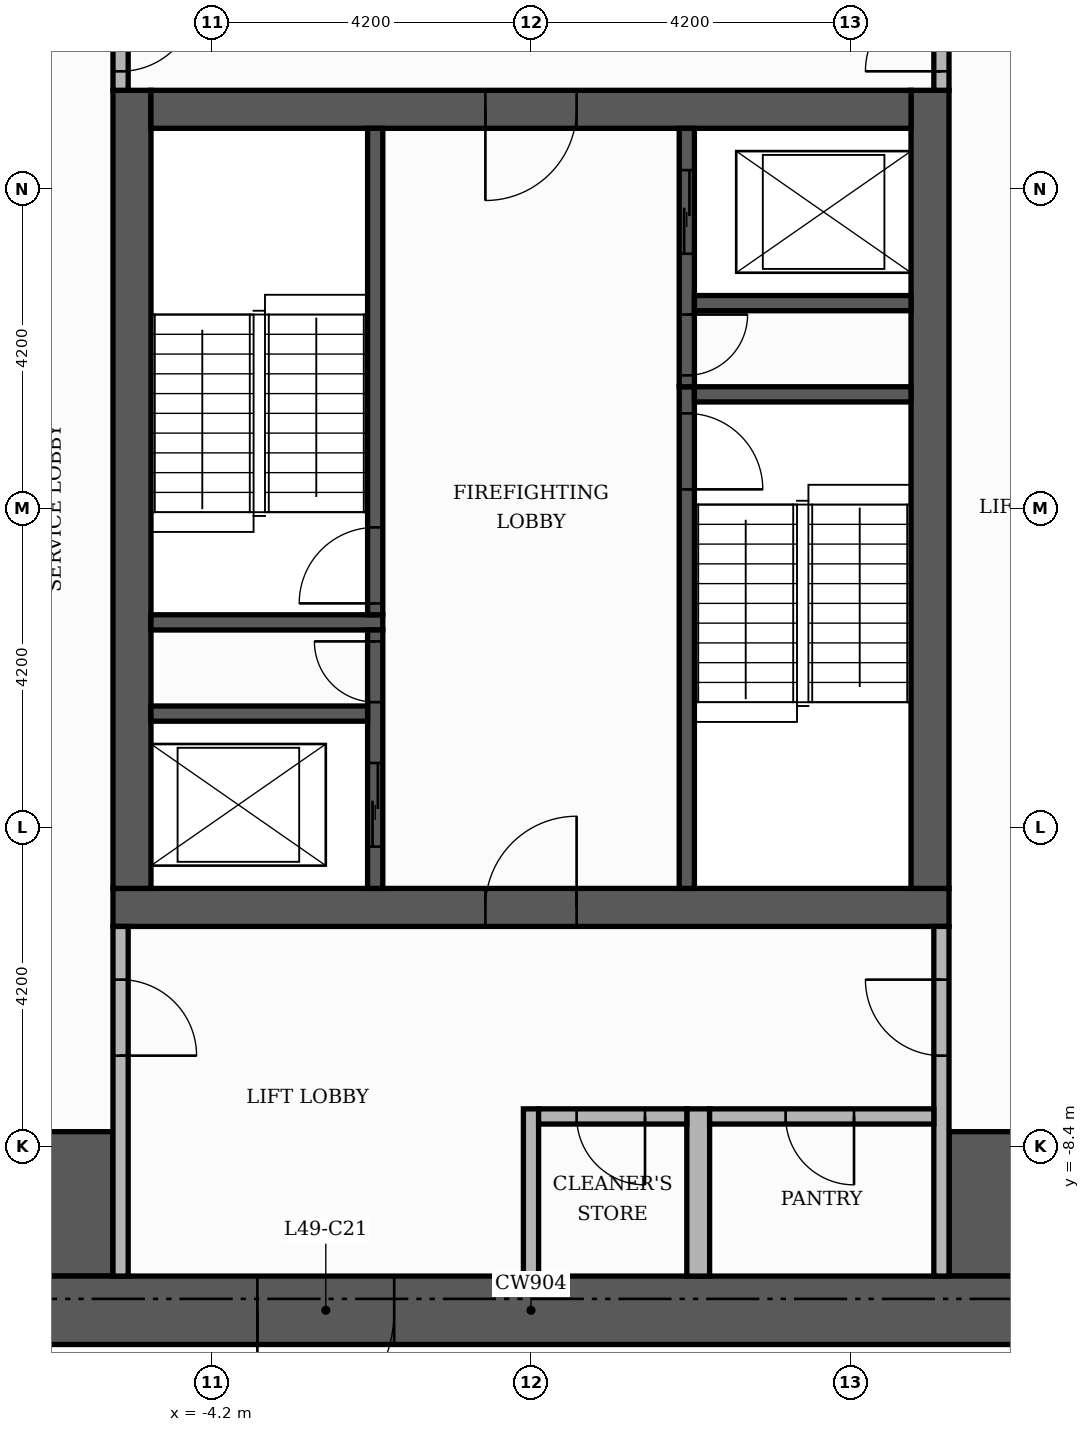
"""IFC4 building model, lengths in metres.
Left out: names, types, materials, properties, quantities, classifications, styles, units other than length and angle.
Written with IfcOpenShell. Run it as: python <this file> out.ifc"""

import sys

from ifc_helpers import new_model, si_unit, direction, frame, frame_2d, origin, place, context, subcontext, project, spatial, rectangle, extrude, element, fill, save


model = new_model("IFC4")
c1 = context("Model", 3, precision=1e-05, world=origin(), true_north=direction((0.0, 1.0)))
c2 = subcontext(c1, "Body", "Model", "MODEL_VIEW")
j1 = project(units=[si_unit("LENGTHUNIT", "METRE"), si_unit("PLANEANGLEUNIT", "RADIAN")], contexts=[c1])
p1 = place(None, origin())
s1 = spatial("IfcSite", under=j1, at=p1, CompositionType="ELEMENT")
p2 = place(p1, origin())
s2 = spatial("IfcBuilding", under=s1, at=p2, CompositionType="ELEMENT")
p3 = place(p2, frame((0.0, 0.0, 207.9)))
s3 = spatial("IfcBuildingStorey", under=s2, at=p3, CompositionType="ELEMENT", Elevation=207.9)
p4 = place(p3, frame((-5.5, -5.25, 0.0), z_axis=(0.0, 0.0, 1.0), x_axis=(1.0, 0.0, 0.0)))
e1 = element("IfcWall", 1, at=p4, inside=s3, PredefinedType="SHEAR", context=c2, shape_type="SweptSolid", body=[
    extrude(rectangle(XDim=11.0, YDim=0.5, at=frame_2d((5.5, 0.0))), origin(), (0.0, 0.0, 1.0), 3.48),
])
p5 = place(p4, frame((4.9, 0.0, 0.0)))
e2 = element("IfcOpeningElement", 2, at=p5, cuts=e1, PredefinedType="OPENING", context=c2, shape_type="SweptSolid", body=[
    extrude(rectangle(XDim=1.2, YDim=2.1, at=frame_2d((0.6, 1.05))), frame((0.0, 0.26, 0.0), z_axis=(0.0, -1.0, 0.0), x_axis=(1.0, 0.0, 0.0)), (0.0, 0.0, 1.0), 0.52),
])
for number, where, z_axis, x_axis in (
    (3, (-5.25, -5.0, 0.0), (0.0, 0.0, 1.0), (0.0, 1.0, 0.0)),
    (4, (5.25, -5.0, 0.0), (0.0, 0.0, 1.0), (0.0, 1.0, 0.0)),
):
    element("IfcWall", number, at=place(p3, frame(where, z_axis=z_axis, x_axis=x_axis)), inside=s3, PredefinedType="SHEAR", context=c2, shape_type="SweptSolid", body=[
        extrude(rectangle(XDim=10.5, YDim=0.5, at=frame_2d((5.25, 0.0))), origin(), (0.0, 0.0, 1.0), 3.48),
    ])
p6 = place(p3, frame((-5.0, 5.25, 0.0), z_axis=(0.0, 0.0, 1.0), x_axis=(1.0, 0.0, 0.0)))
e5 = element("IfcWall", 5, at=p6, inside=s3, PredefinedType="SHEAR", context=c2, shape_type="SweptSolid", body=[
    extrude(rectangle(XDim=10.0, YDim=0.5, at=frame_2d((5.0, 0.0))), origin(), (0.0, 0.0, 1.0), 3.48),
])
p7 = place(p6, frame((4.4, 0.0, 0.0)))
e6 = element("IfcOpeningElement", 6, at=p7, cuts=e5, PredefinedType="OPENING", context=c2, shape_type="SweptSolid", body=[
    extrude(rectangle(XDim=1.2, YDim=2.1, at=frame_2d((0.6, 1.05))), frame((0.0, 0.26, 0.0), z_axis=(0.0, -1.0, 0.0), x_axis=(1.0, 0.0, 0.0)), (0.0, 0.0, 1.0), 0.52),
])
for number, where, z_axis, x_axis in (
    (7, (-10.1, -9.15, 0.0), (0.0, 0.0, 1.0), (1.0, 0.0, 0.0)),
    (8, (5.5, -9.15, 0.0), (0.0, 0.0, 1.0), (1.0, 0.0, 0.0)),
):
    element("IfcWall", number, at=place(p3, frame(where, z_axis=z_axis, x_axis=x_axis)), inside=s3, PredefinedType="SHEAR", context=c2, shape_type="SweptSolid", body=[
        extrude(rectangle(XDim=4.6, YDim=1.9, at=frame_2d((2.3, 0.0))), origin(), (0.0, 0.0, 1.0), 3.48),
    ])
p8 = place(p3, frame((2.05, -5.0, 0.0), z_axis=(0.0, 0.0, 1.0), x_axis=(0.0, 1.0, 0.0)))
e9 = element("IfcWall", 9, at=p8, inside=s3, PredefinedType="SHEAR", context=c2, shape_type="SweptSolid", body=[
    extrude(rectangle(XDim=6.6, YDim=0.2, at=frame_2d((3.3, 0.0))), origin(), (0.0, 0.0, 1.0), 3.48),
])
p9 = place(p8, frame((5.25, 0.0, 0.0)))
e10 = element("IfcOpeningElement", 10, at=p9, cuts=e9, PredefinedType="OPENING", context=c2, shape_type="SweptSolid", body=[
    extrude(rectangle(XDim=1.0, YDim=2.1, at=frame_2d((0.5, 1.05))), frame((0.0, 0.11, 0.0), z_axis=(0.0, -1.0, 0.0), x_axis=(1.0, 0.0, 0.0)), (0.0, 0.0, 1.0), 0.22),
])
p10 = place(p3, frame((-5.0, -1.5, 0.0), z_axis=(0.0, 0.0, 1.0), x_axis=(1.0, 0.0, 0.0)))
e11 = element("IfcWall", 11, at=p10, inside=s3, PredefinedType="SHEAR", context=c2, shape_type="SweptSolid", body=[
    extrude(rectangle(XDim=3.05, YDim=0.2, at=frame_2d((1.525, 0.0))), origin(), (0.0, 0.0, 1.0), 3.48),
])
p11 = place(p3, frame((-2.05, -1.4, 0.0), z_axis=(0.0, 0.0, 1.0), x_axis=(0.0, 1.0, 0.0)))
e12 = element("IfcWall", 12, at=p11, inside=s3, PredefinedType="SHEAR", context=c2, shape_type="SweptSolid", body=[
    extrude(rectangle(XDim=6.4, YDim=0.2, at=frame_2d((3.2, 0.0))), origin(), (0.0, 0.0, 1.0), 3.48),
])
p12 = place(p11, frame((0.15, 0.0, 0.0)))
e13 = element("IfcOpeningElement", 13, at=p12, cuts=e12, PredefinedType="OPENING", context=c2, shape_type="SweptSolid", body=[
    extrude(rectangle(XDim=1.0, YDim=2.1, at=frame_2d((0.5, 1.05))), frame((0.0, 0.11, 0.0), z_axis=(0.0, -1.0, 0.0), x_axis=(1.0, 0.0, 0.0)), (0.0, 0.0, 1.0), 0.22),
])
p13 = place(p3, frame((2.15, 1.5, 0.0), z_axis=(0.0, 0.0, 1.0), x_axis=(1.0, 0.0, 0.0)))
e14 = element("IfcWall", 14, at=p13, inside=s3, PredefinedType="SHEAR", context=c2, shape_type="SweptSolid", body=[
    extrude(rectangle(XDim=2.85, YDim=0.2, at=frame_2d((1.425, 0.0))), origin(), (0.0, 0.0, 1.0), 3.48),
])
p14 = place(p3, frame((-2.05, -5.0, 0.0), z_axis=(0.0, 0.0, 1.0), x_axis=(0.0, 1.0, 0.0)))
e15 = element("IfcWall", 15, at=p14, inside=s3, PredefinedType="SHEAR", context=c2, shape_type="SweptSolid", body=[
    extrude(rectangle(XDim=3.4, YDim=0.2, at=frame_2d((1.7, 0.0))), origin(), (0.0, 0.0, 1.0), 3.48),
])
p15 = place(p14, frame((0.55, 0.0, 0.0)))
e16 = element("IfcOpeningElement", 16, at=p15, cuts=e15, PredefinedType="OPENING", context=c2, shape_type="SweptSolid", body=[
    extrude(rectangle(XDim=1.1, YDim=2.1, at=frame_2d((0.55, 1.05))), frame((0.0, 0.11, 0.0), z_axis=(0.0, -1.0, 0.0), x_axis=(1.0, 0.0, 0.0)), (0.0, 0.0, 1.0), 0.22),
])
p16 = place(p14, frame((2.45, 0.0, 0.0)))
e17 = element("IfcOpeningElement", 17, at=p16, cuts=e15, PredefinedType="OPENING", context=c2, shape_type="SweptSolid", body=[
    extrude(rectangle(XDim=0.8, YDim=2.1, at=frame_2d((0.4, 1.05))), frame((0.0, 0.11, 0.0), z_axis=(0.0, -1.0, 0.0), x_axis=(1.0, 0.0, 0.0)), (0.0, 0.0, 1.0), 0.22),
])
p17 = place(p3, frame((-5.0, -2.7, 0.0), z_axis=(0.0, 0.0, 1.0), x_axis=(1.0, 0.0, 0.0)))
e18 = element("IfcWall", 18, at=p17, inside=s3, PredefinedType="SHEAR", context=c2, shape_type="SweptSolid", body=[
    extrude(rectangle(XDim=2.85, YDim=0.2, at=frame_2d((1.425, 0.0))), origin(), (0.0, 0.0, 1.0), 3.48),
])
p18 = place(p3, frame((2.05, 1.6, 0.0), z_axis=(0.0, 0.0, 1.0), x_axis=(0.0, 1.0, 0.0)))
e19 = element("IfcWall", 19, at=p18, inside=s3, PredefinedType="SHEAR", context=c2, shape_type="SweptSolid", body=[
    extrude(rectangle(XDim=3.4, YDim=0.2, at=frame_2d((1.7, 0.0))), origin(), (0.0, 0.0, 1.0), 3.48),
])
p19 = place(p18, frame((1.75, 0.0, 0.0)))
e20 = element("IfcOpeningElement", 20, at=p19, cuts=e19, PredefinedType="OPENING", context=c2, shape_type="SweptSolid", body=[
    extrude(rectangle(XDim=1.1, YDim=2.1, at=frame_2d((0.55, 1.05))), frame((0.0, 0.11, 0.0), z_axis=(0.0, -1.0, 0.0), x_axis=(1.0, 0.0, 0.0)), (0.0, 0.0, 1.0), 0.22),
])
p20 = place(p18, frame((0.15, 0.0, 0.0)))
e21 = element("IfcOpeningElement", 21, at=p20, cuts=e19, PredefinedType="OPENING", context=c2, shape_type="SweptSolid", body=[
    extrude(rectangle(XDim=0.8, YDim=2.1, at=frame_2d((0.4, 1.05))), frame((0.0, 0.11, 0.0), z_axis=(0.0, -1.0, 0.0), x_axis=(1.0, 0.0, 0.0)), (0.0, 0.0, 1.0), 0.22),
])
p21 = place(p3, frame((2.15, 2.7, 0.0), z_axis=(0.0, 0.0, 1.0), x_axis=(1.0, 0.0, 0.0)))
e22 = element("IfcWall", 22, at=p21, inside=s3, PredefinedType="SHEAR", context=c2, shape_type="SweptSolid", body=[
    extrude(rectangle(XDim=2.85, YDim=0.2, at=frame_2d((1.425, 0.0))), origin(), (0.0, 0.0, 1.0), 3.48),
])
p22 = place(p3, frame((-11.0, -10.55, 0.0), z_axis=(0.0, 0.0, 1.0), x_axis=(1.0, 0.0, 0.0)))
e23 = element("IfcWall", 23, at=p22, inside=s3, PredefinedType="SHEAR", context=c2, shape_type="SweptSolid", body=[
    extrude(rectangle(XDim=22.0, YDim=0.9, at=frame_2d((11.0, 0.0))), origin(), (0.0, 0.0, 1.0), 3.48),
])
p23 = place(p22, frame((7.4, 0.0, 0.0)))
e24 = element("IfcOpeningElement", 24, at=p23, cuts=e23, PredefinedType="OPENING", context=c2, shape_type="SweptSolid", body=[
    extrude(rectangle(XDim=1.8, YDim=2.2, at=frame_2d((0.9, 1.1))), frame((0.0, 0.46, 0.0), z_axis=(0.0, -1.0, 0.0), x_axis=(1.0, 0.0, 0.0)), (0.0, 0.0, 1.0), 0.92),
])
p24 = place(p3, frame((-5.4, -10.1, 0.0), z_axis=(0.0, 0.0, 1.0), x_axis=(0.0, 1.0, 0.0)))
e25 = element("IfcWall", 25, at=p24, inside=s3, PredefinedType="PARTITIONING", context=c2, shape_type="SweptSolid", body=[
    extrude(rectangle(XDim=4.6, YDim=0.2, at=frame_2d((2.3, 0.0))), origin(), (0.0, 0.0, 1.0), 3.48),
])
p25 = place(p24, frame((2.9, 0.0, 0.0)))
e26 = element("IfcOpeningElement", 26, at=p25, cuts=e25, PredefinedType="OPENING", context=c2, shape_type="SweptSolid", body=[
    extrude(rectangle(XDim=1.0, YDim=2.1, at=frame_2d((0.5, 1.05))), frame((0.0, 0.11, 0.0), z_axis=(0.0, -1.0, 0.0), x_axis=(1.0, 0.0, 0.0)), (0.0, 0.0, 1.0), 0.22),
])
p26 = place(p3, frame((0.0, -10.1, 0.0), z_axis=(0.0, 0.0, 1.0), x_axis=(0.0, 1.0, 0.0)))
e27 = element("IfcWall", 27, at=p26, inside=s3, PredefinedType="PARTITIONING", context=c2, shape_type="SweptSolid", body=[
    extrude(rectangle(XDim=2.2, YDim=0.2, at=frame_2d((1.1, 0.0))), origin(), (0.0, 0.0, 1.0), 3.48),
])
p27 = place(p3, frame((2.2, -10.1, 0.0), z_axis=(0.0, 0.0, 1.0), x_axis=(0.0, 1.0, 0.0)))
e28 = element("IfcWall", 28, at=p27, inside=s3, PredefinedType="PARTITIONING", context=c2, shape_type="SweptSolid", body=[
    extrude(rectangle(XDim=2.2, YDim=0.3, at=frame_2d((1.1, 0.0))), origin(), (0.0, 0.0, 1.0), 3.48),
])
p28 = place(p3, frame((5.4, -10.1, 0.0), z_axis=(0.0, 0.0, 1.0), x_axis=(0.0, 1.0, 0.0)))
e29 = element("IfcWall", 29, at=p28, inside=s3, PredefinedType="PARTITIONING", context=c2, shape_type="SweptSolid", body=[
    extrude(rectangle(XDim=4.6, YDim=0.2, at=frame_2d((2.3, 0.0))), origin(), (0.0, 0.0, 1.0), 3.48),
])
p29 = place(p28, frame((2.9, 0.0, 0.0)))
e30 = element("IfcOpeningElement", 30, at=p29, cuts=e29, PredefinedType="OPENING", context=c2, shape_type="SweptSolid", body=[
    extrude(rectangle(XDim=1.0, YDim=2.1, at=frame_2d((0.5, 1.05))), frame((0.0, 0.11, 0.0), z_axis=(0.0, -1.0, 0.0), x_axis=(1.0, 0.0, 0.0)), (0.0, 0.0, 1.0), 0.22),
])
p30 = place(p3, frame((0.1, -8.0, 0.0), z_axis=(0.0, 0.0, 1.0), x_axis=(1.0, 0.0, 0.0)))
e31 = element("IfcWall", 31, at=p30, inside=s3, PredefinedType="PARTITIONING", context=c2, shape_type="SweptSolid", body=[
    extrude(rectangle(XDim=1.95, YDim=0.2, at=frame_2d((0.975, 0.0))), origin(), (0.0, 0.0, 1.0), 3.48),
])
p31 = place(p30, frame((0.5, 0.0, 0.0)))
e32 = element("IfcOpeningElement", 32, at=p31, cuts=e31, PredefinedType="OPENING", context=c2, shape_type="SweptSolid", body=[
    extrude(rectangle(XDim=0.9, YDim=2.1, at=frame_2d((0.45, 1.05))), frame((0.0, 0.11, 0.0), z_axis=(0.0, -1.0, 0.0), x_axis=(1.0, 0.0, 0.0)), (0.0, 0.0, 1.0), 0.22),
])
p32 = place(p3, frame((2.35, -8.0, 0.0), z_axis=(0.0, 0.0, 1.0), x_axis=(1.0, 0.0, 0.0)))
e33 = element("IfcWall", 33, at=p32, inside=s3, PredefinedType="PARTITIONING", context=c2, shape_type="SweptSolid", body=[
    extrude(rectangle(XDim=2.95, YDim=0.2, at=frame_2d((1.475, 0.0))), origin(), (0.0, 0.0, 1.0), 3.48),
])
p33 = place(p32, frame((1.0, 0.0, 0.0)))
e34 = element("IfcOpeningElement", 34, at=p33, cuts=e33, PredefinedType="OPENING", context=c2, shape_type="SweptSolid", body=[
    extrude(rectangle(XDim=0.9, YDim=2.1, at=frame_2d((0.45, 1.05))), frame((0.0, 0.11, 0.0), z_axis=(0.0, -1.0, 0.0), x_axis=(1.0, 0.0, 0.0)), (0.0, 0.0, 1.0), 0.22),
])
p34 = place(p3, frame((-5.4, 5.5, 0.0), z_axis=(0.0, 0.0, 1.0), x_axis=(0.0, 1.0, 0.0)))
e35 = element("IfcWall", 35, at=p34, inside=s3, PredefinedType="PARTITIONING", context=c2, shape_type="SweptSolid", body=[
    extrude(rectangle(XDim=1.55, YDim=0.2, at=frame_2d((0.775, 0.0))), origin(), (0.0, 0.0, 1.0), 3.48),
])
p35 = place(p34, frame((0.25, 0.0, 0.0)))
e36 = element("IfcOpeningElement", 36, at=p35, cuts=e35, PredefinedType="OPENING", context=c2, shape_type="SweptSolid", body=[
    extrude(rectangle(XDim=1.0, YDim=2.1, at=frame_2d((0.5, 1.05))), frame((0.0, 0.11, 0.0), z_axis=(0.0, -1.0, 0.0), x_axis=(1.0, 0.0, 0.0)), (0.0, 0.0, 1.0), 0.22),
])
p36 = place(p3, frame((5.4, 5.5, 0.0), z_axis=(0.0, 0.0, 1.0), x_axis=(0.0, 1.0, 0.0)))
e37 = element("IfcWall", 37, at=p36, inside=s3, PredefinedType="PARTITIONING", context=c2, shape_type="SweptSolid", body=[
    extrude(rectangle(XDim=4.6, YDim=0.2, at=frame_2d((2.3, 0.0))), origin(), (0.0, 0.0, 1.0), 3.48),
])
p37 = place(p36, frame((0.25, 0.0, 0.0)))
e38 = element("IfcOpeningElement", 38, at=p37, cuts=e37, PredefinedType="OPENING", context=c2, shape_type="SweptSolid", body=[
    extrude(rectangle(XDim=1.0, YDim=2.1, at=frame_2d((0.5, 1.05))), frame((0.0, 0.11, 0.0), z_axis=(0.0, -1.0, 0.0), x_axis=(1.0, 0.0, 0.0)), (0.0, 0.0, 1.0), 0.22),
])
p38 = place(p19, origin())
e39 = element("IfcDoor", 39, at=p38, inside=s3, OperationType="SLIDING_TO_LEFT", PredefinedType="DOOR", context=c2, shape_type="SweptSolid", body=[
    extrude(rectangle(XDim=1.1, YDim=2.1, at=frame_2d((0.55, 1.05))), frame((0.0, 0.025, 0.0), z_axis=(0.0, -1.0, 0.0), x_axis=(1.0, 0.0, 0.0)), (0.0, 0.0, 1.0), 0.05),
])
fill(e20, e39)
p39 = place(p15, origin())
e40 = element("IfcDoor", 40, at=p39, inside=s3, OperationType="SLIDING_TO_LEFT", PredefinedType="DOOR", context=c2, shape_type="SweptSolid", body=[
    extrude(rectangle(XDim=1.1, YDim=2.1, at=frame_2d((0.55, 1.05))), frame((0.0, 0.025, 0.0), z_axis=(0.0, -1.0, 0.0), x_axis=(1.0, 0.0, 0.0)), (0.0, 0.0, 1.0), 0.05),
])
fill(e16, e40)
p40 = place(p12, origin())
e41 = element("IfcDoor", 41, at=p40, inside=s3, OperationType="SINGLE_SWING_LEFT", PredefinedType="DOOR", context=c2, shape_type="SweptSolid", body=[
    extrude(rectangle(XDim=1.0, YDim=2.1, at=frame_2d((0.5, 1.05))), frame((0.0, 0.025, 0.0), z_axis=(0.0, -1.0, 0.0), x_axis=(1.0, 0.0, 0.0)), (0.0, 0.0, 1.0), 0.05),
])
fill(e13, e41)
p41 = place(p9, frame((1.0, 0.0, 0.0), z_axis=(0.0, 0.0, 1.0), x_axis=(-1.0, 0.0, 0.0)))
e42 = element("IfcDoor", 42, at=p41, inside=s3, OperationType="SINGLE_SWING_LEFT", PredefinedType="DOOR", context=c2, shape_type="SweptSolid", body=[
    extrude(rectangle(XDim=1.0, YDim=2.1, at=frame_2d((0.5, 1.05))), frame((0.0, 0.025, 0.0), z_axis=(0.0, -1.0, 0.0), x_axis=(1.0, 0.0, 0.0)), (0.0, 0.0, 1.0), 0.05),
])
fill(e10, e42)
p42 = place(p20, frame((0.8, 0.0, 0.0), z_axis=(0.0, 0.0, 1.0), x_axis=(-1.0, 0.0, 0.0)))
e43 = element("IfcDoor", 43, at=p42, inside=s3, OperationType="SINGLE_SWING_RIGHT", PredefinedType="DOOR", context=c2, shape_type="SweptSolid", body=[
    extrude(rectangle(XDim=0.8, YDim=2.1, at=frame_2d((0.4, 1.05))), frame((0.0, 0.025, 0.0), z_axis=(0.0, -1.0, 0.0), x_axis=(1.0, 0.0, 0.0)), (0.0, 0.0, 1.0), 0.05),
])
fill(e21, e43)
p43 = place(p16, origin())
e44 = element("IfcDoor", 44, at=p43, inside=s3, OperationType="SINGLE_SWING_RIGHT", PredefinedType="DOOR", context=c2, shape_type="SweptSolid", body=[
    extrude(rectangle(XDim=0.8, YDim=2.1, at=frame_2d((0.4, 1.05))), frame((0.0, 0.025, 0.0), z_axis=(0.0, -1.0, 0.0), x_axis=(1.0, 0.0, 0.0)), (0.0, 0.0, 1.0), 0.05),
])
fill(e17, e44)
p44 = place(p7, frame((1.2, 0.0, 0.0), z_axis=(0.0, 0.0, 1.0), x_axis=(-1.0, 0.0, 0.0)))
e45 = element("IfcDoor", 45, at=p44, inside=s3, OperationType="SINGLE_SWING_LEFT", PredefinedType="DOOR", context=c2, shape_type="SweptSolid", body=[
    extrude(rectangle(XDim=1.2, YDim=2.1, at=frame_2d((0.6, 1.05))), frame((0.0, 0.025, 0.0), z_axis=(0.0, -1.0, 0.0), x_axis=(1.0, 0.0, 0.0)), (0.0, 0.0, 1.0), 0.05),
])
fill(e6, e45)
p45 = place(p5, origin())
e46 = element("IfcDoor", 46, at=p45, inside=s3, OperationType="SINGLE_SWING_RIGHT", PredefinedType="DOOR", context=c2, shape_type="SweptSolid", body=[
    extrude(rectangle(XDim=1.2, YDim=2.1, at=frame_2d((0.6, 1.05))), frame((0.0, 0.025, 0.0), z_axis=(0.0, -1.0, 0.0), x_axis=(1.0, 0.0, 0.0)), (0.0, 0.0, 1.0), 0.05),
])
fill(e2, e46)
p46 = place(p35, frame((1.0, 0.0, 0.0), z_axis=(0.0, 0.0, 1.0), x_axis=(-1.0, 0.0, 0.0)))
e47 = element("IfcDoor", 47, at=p46, inside=s3, OperationType="SINGLE_SWING_RIGHT", PredefinedType="DOOR", context=c2, shape_type="SweptSolid", body=[
    extrude(rectangle(XDim=1.0, YDim=2.1, at=frame_2d((0.5, 1.05))), frame((0.0, 0.025, 0.0), z_axis=(0.0, -1.0, 0.0), x_axis=(1.0, 0.0, 0.0)), (0.0, 0.0, 1.0), 0.05),
])
fill(e36, e47)
p47 = place(p37, origin())
e48 = element("IfcDoor", 48, at=p47, inside=s3, OperationType="SINGLE_SWING_LEFT", PredefinedType="DOOR", context=c2, shape_type="SweptSolid", body=[
    extrude(rectangle(XDim=1.0, YDim=2.1, at=frame_2d((0.5, 1.05))), frame((0.0, 0.025, 0.0), z_axis=(0.0, -1.0, 0.0), x_axis=(1.0, 0.0, 0.0)), (0.0, 0.0, 1.0), 0.05),
])
fill(e38, e48)
p48 = place(p25, frame((1.0, 0.0, 0.0), z_axis=(0.0, 0.0, 1.0), x_axis=(-1.0, 0.0, 0.0)))
e49 = element("IfcDoor", 49, at=p48, inside=s3, OperationType="SINGLE_SWING_LEFT", PredefinedType="DOOR", context=c2, shape_type="SweptSolid", body=[
    extrude(rectangle(XDim=1.0, YDim=2.1, at=frame_2d((0.5, 1.05))), frame((0.0, 0.025, 0.0), z_axis=(0.0, -1.0, 0.0), x_axis=(1.0, 0.0, 0.0)), (0.0, 0.0, 1.0), 0.05),
])
fill(e26, e49)
p49 = place(p29, origin())
e50 = element("IfcDoor", 50, at=p49, inside=s3, OperationType="SINGLE_SWING_RIGHT", PredefinedType="DOOR", context=c2, shape_type="SweptSolid", body=[
    extrude(rectangle(XDim=1.0, YDim=2.1, at=frame_2d((0.5, 1.05))), frame((0.0, 0.025, 0.0), z_axis=(0.0, -1.0, 0.0), x_axis=(1.0, 0.0, 0.0)), (0.0, 0.0, 1.0), 0.05),
])
fill(e30, e50)
p50 = place(p23, frame((1.8, 0.0, 0.0), z_axis=(0.0, 0.0, 1.0), x_axis=(-1.0, 0.0, 0.0)))
e51 = element("IfcDoor", 51, at=p50, inside=s3, OperationType="DOUBLE_DOOR_SINGLE_SWING", PredefinedType="DOOR", context=c2, shape_type="SweptSolid", body=[
    extrude(rectangle(XDim=1.8, YDim=2.2, at=frame_2d((0.9, 1.1))), frame((0.0, 0.025, 0.0), z_axis=(0.0, -1.0, 0.0), x_axis=(1.0, 0.0, 0.0)), (0.0, 0.0, 1.0), 0.05),
])
fill(e24, e51)
p51 = place(p31, frame((0.9, 0.0, 0.0), z_axis=(0.0, 0.0, 1.0), x_axis=(-1.0, 0.0, 0.0)))
e52 = element("IfcDoor", 52, at=p51, inside=s3, OperationType="SINGLE_SWING_RIGHT", PredefinedType="DOOR", context=c2, shape_type="SweptSolid", body=[
    extrude(rectangle(XDim=0.9, YDim=2.1, at=frame_2d((0.45, 1.05))), frame((0.0, 0.025, 0.0), z_axis=(0.0, -1.0, 0.0), x_axis=(1.0, 0.0, 0.0)), (0.0, 0.0, 1.0), 0.05),
])
fill(e32, e52)
p52 = place(p33, frame((0.9, 0.0, 0.0), z_axis=(0.0, 0.0, 1.0), x_axis=(-1.0, 0.0, 0.0)))
e53 = element("IfcDoor", 53, at=p52, inside=s3, OperationType="SINGLE_SWING_RIGHT", PredefinedType="DOOR", context=c2, shape_type="SweptSolid", body=[
    extrude(rectangle(XDim=0.9, YDim=2.1, at=frame_2d((0.45, 1.05))), frame((0.0, 0.025, 0.0), z_axis=(0.0, -1.0, 0.0), x_axis=(1.0, 0.0, 0.0)), (0.0, 0.0, 1.0), 0.05),
])
fill(e34, e53)
save(model, sys.argv[1])
